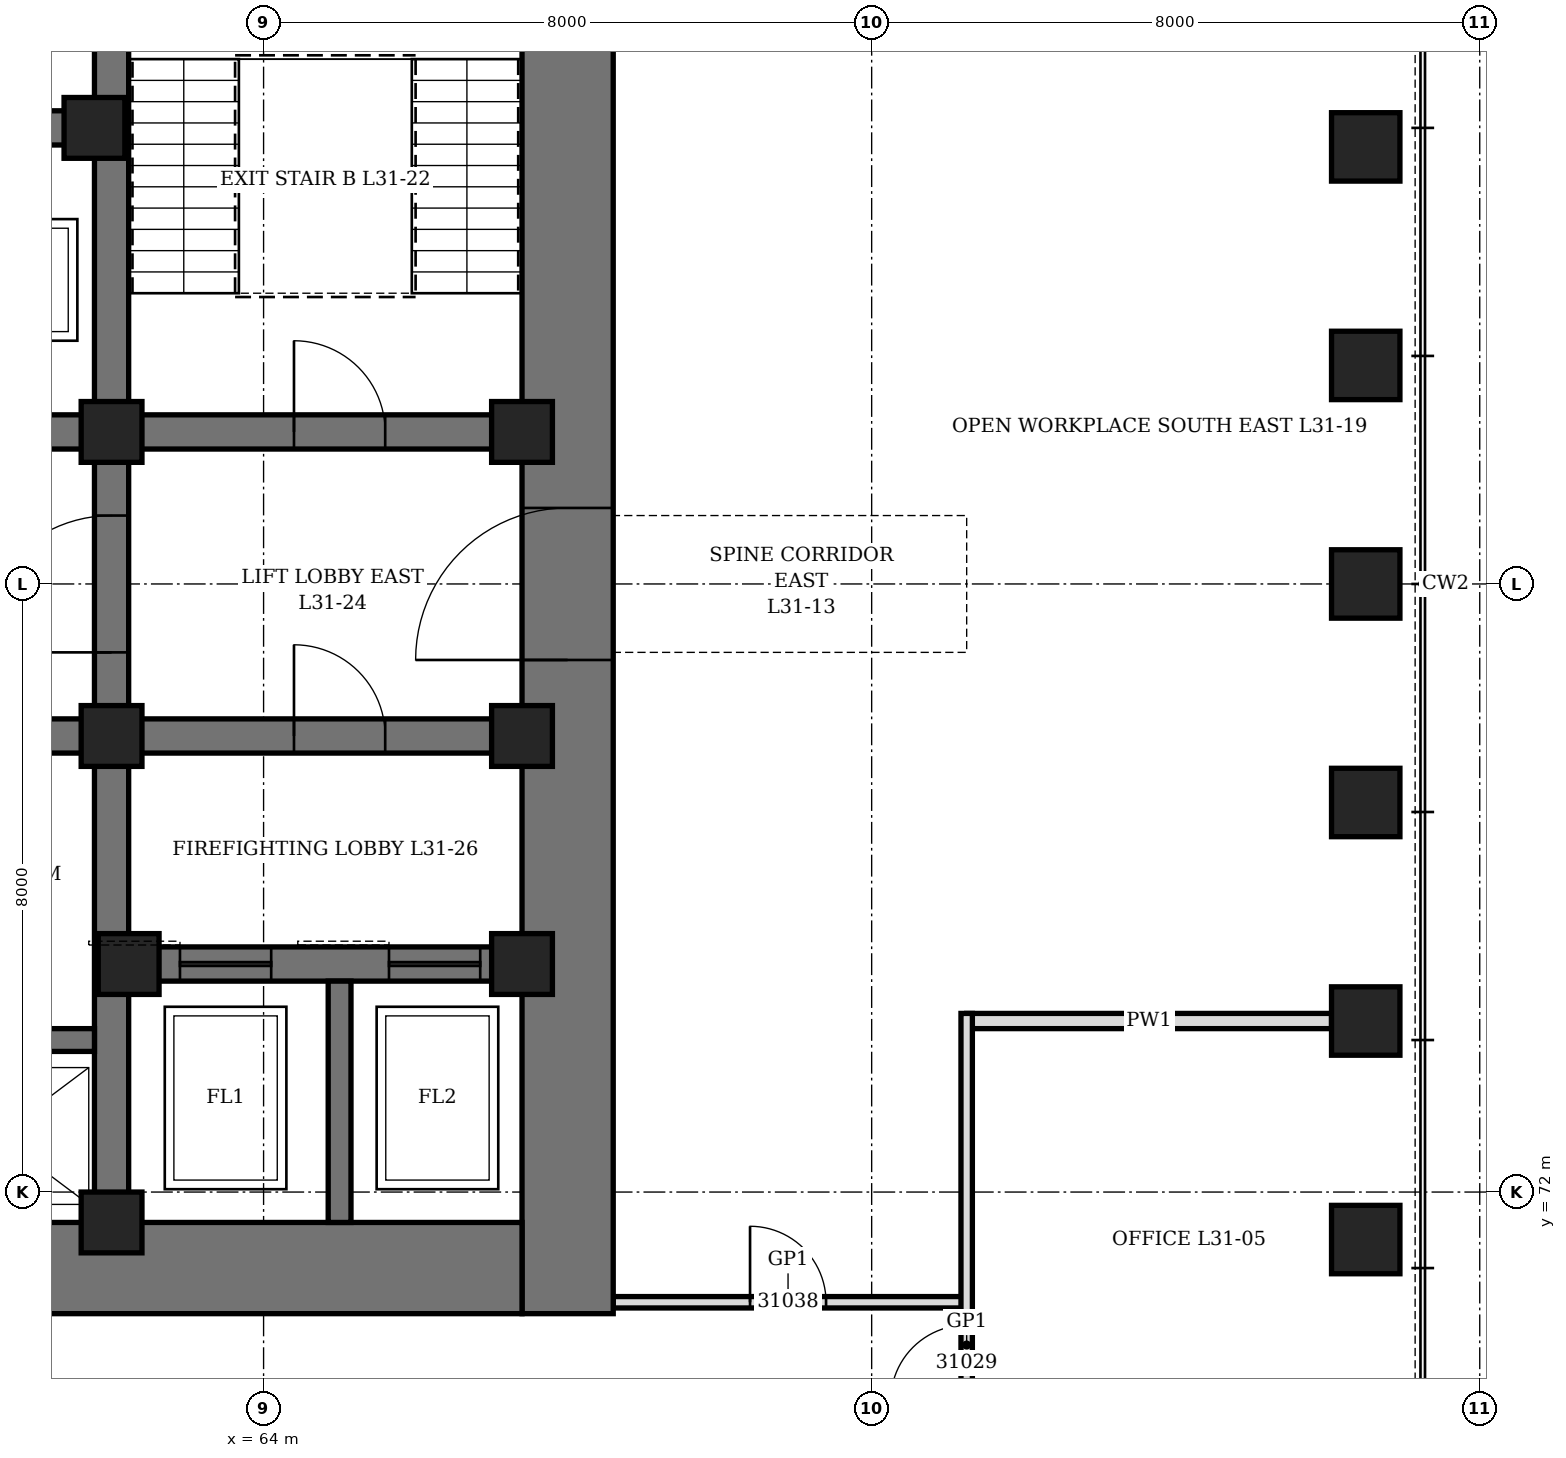
"""IFC4 building model, lengths in metres.
Left out: names, types, materials, properties, quantities, classifications, styles, units other than length and angle.
Written with IfcOpenShell. Run it as: python <this file> out.ifc"""

import sys

from ifc_helpers import new_model, si_unit, direction, frame, frame_2d, origin, origin_2d, place, context, subcontext, project, spatial, rectangle, hollow_rectangle, extrude, element, fill, save


model = new_model("IFC4")
c1 = context("Model", 3, precision=1e-05, world=origin(), true_north=direction((0.0, 1.0)))
c2 = subcontext(c1, "Body", "Model", "MODEL_VIEW")
j1 = project(units=[si_unit("LENGTHUNIT", "METRE"), si_unit("PLANEANGLEUNIT", "RADIAN")], contexts=[c1])
p1 = place(None, origin())
s1 = spatial("IfcSite", under=j1, at=p1, CompositionType="ELEMENT")
p2 = place(p1, origin())
s2 = spatial("IfcBuilding", under=s1, at=p2, CompositionType="ELEMENT")
p3 = place(p2, frame((0.0, 0.0, 141.7)))
s3 = spatial("IfcBuildingStorey", under=s2, at=p3, CompositionType="ELEMENT", Elevation=141.7)
for number, where, z_axis, x_axis in (
    (1, (78.5, 71.375, 0.0), (0.0, 0.0, 1.0), (0.0, 1.0, 0.0)),
    (2, (78.5, 74.25, 0.0), (0.0, 0.0, 1.0), (0.0, 1.0, 0.0)),
    (3, (78.5, 77.125, 0.0), (0.0, 0.0, 1.0), (0.0, 1.0, 0.0)),
    (4, (78.5, 80.0, 0.0), (0.0, 0.0, 1.0), (0.0, 1.0, 0.0)),
    (5, (78.5, 82.875, 0.0), (0.0, 0.0, 1.0), (0.0, 1.0, 0.0)),
    (6, (78.5, 85.75, 0.0), (0.0, 0.0, 1.0), (0.0, 1.0, 0.0)),
):
    element("IfcColumn", number, at=place(p3, frame(where, z_axis=z_axis, x_axis=x_axis)), inside=s3, PredefinedType="COLUMN", context=c2, shape_type="SweptSolid", body=[
        extrude(hollow_rectangle(XDim=0.9, YDim=0.9, WallThickness=0.12, at=origin_2d()), origin(), (0.0, 0.0, 1.0), 4.2),
    ])
p4 = place(p3, frame((68.0, 70.4, 0.0), z_axis=(0.0, 0.0, 1.0), x_axis=(0.0, 1.0, 0.0)))
e7 = element("IfcWall", 7, at=p4, inside=s3, PredefinedType="SHEAR", context=c2, shape_type="SweptSolid", body=[
    extrude(rectangle(XDim=19.2, YDim=1.2, at=frame_2d((9.6, 0.0))), origin(), (0.0, 0.0, 1.0), 4.2),
])
p5 = place(p4, frame((8.6, 0.0, 0.0)))
e8 = element("IfcOpeningElement", 8, at=p5, cuts=e7, PredefinedType="OPENING", context=c2, shape_type="SweptSolid", body=[
    extrude(rectangle(XDim=2.0, YDim=2.4, at=frame_2d((1.0, 1.2))), frame((0.0, 0.61, 0.0), z_axis=(0.0, -1.0, 0.0), x_axis=(1.0, 0.0, 0.0)), (0.0, 0.0, 1.0), 1.22),
])
p6 = place(p3, frame((44.6, 71.0, 0.0), z_axis=(0.0, 0.0, 1.0), x_axis=(1.0, 0.0, 0.0)))
e9 = element("IfcWall", 9, at=p6, inside=s3, PredefinedType="SHEAR", context=c2, shape_type="SweptSolid", body=[
    extrude(rectangle(XDim=22.8, YDim=1.2, at=frame_2d((11.4, 0.0))), origin(), (0.0, 0.0, 1.0), 4.2),
])
p7 = place(p3, frame((62.0, 71.6, 0.0), z_axis=(0.0, 0.0, 1.0), x_axis=(0.0, 1.0, 0.0)))
e10 = element("IfcWall", 10, at=p7, inside=s3, PredefinedType="SHEAR", context=c2, shape_type="SweptSolid", body=[
    extrude(rectangle(XDim=16.8, YDim=0.45, at=frame_2d((8.4, 0.0))), origin(), (0.0, 0.0, 1.0), 4.2),
])
p8 = place(p7, frame((7.5, 0.0, 0.0)))
e11 = element("IfcOpeningElement", 11, at=p8, cuts=e10, PredefinedType="OPENING", context=c2, shape_type="SweptSolid", body=[
    extrude(rectangle(XDim=1.8, YDim=2.4, at=frame_2d((0.9, 1.2))), frame((0.0, 0.235, 0.0), z_axis=(0.0, -1.0, 0.0), x_axis=(1.0, 0.0, 0.0)), (0.0, 0.0, 1.0), 0.47),
])
p9 = place(p3, frame((62.225, 75.0, 0.0), z_axis=(0.0, 0.0, 1.0), x_axis=(1.0, 0.0, 0.0)))
e12 = element("IfcWall", 12, at=p9, inside=s3, PredefinedType="SHEAR", context=c2, shape_type="SweptSolid", body=[
    extrude(rectangle(XDim=5.175, YDim=0.45, at=frame_2d((2.587, 0.0))), origin(), (0.0, 0.0, 1.0), 4.2),
])
p10 = place(p9, frame((0.675, 0.0, 0.0)))
e13 = element("IfcOpeningElement", 13, at=p10, cuts=e12, PredefinedType="OPENING", context=c2, shape_type="SweptSolid", body=[
    extrude(rectangle(XDim=1.2, YDim=2.2, at=frame_2d((0.6, 1.1))), frame((0.0, 0.235, 0.0), z_axis=(0.0, -1.0, 0.0), x_axis=(1.0, 0.0, 0.0)), (0.0, 0.0, 1.0), 0.47),
])
p11 = place(p9, frame((3.425, 0.0, 0.0)))
e14 = element("IfcOpeningElement", 14, at=p11, cuts=e12, PredefinedType="OPENING", context=c2, shape_type="SweptSolid", body=[
    extrude(rectangle(XDim=1.2, YDim=2.2, at=frame_2d((0.6, 1.1))), frame((0.0, 0.235, 0.0), z_axis=(0.0, -1.0, 0.0), x_axis=(1.0, 0.0, 0.0)), (0.0, 0.0, 1.0), 0.47),
])
p12 = place(p3, frame((62.225, 78.0, 0.0), z_axis=(0.0, 0.0, 1.0), x_axis=(1.0, 0.0, 0.0)))
e15 = element("IfcWall", 15, at=p12, inside=s3, PredefinedType="SHEAR", context=c2, shape_type="SweptSolid", body=[
    extrude(rectangle(XDim=5.175, YDim=0.45, at=frame_2d((2.587, 0.0))), origin(), (0.0, 0.0, 1.0), 4.2),
])
p13 = place(p12, frame((2.175, 0.0, 0.0)))
e16 = element("IfcOpeningElement", 16, at=p13, cuts=e15, PredefinedType="OPENING", context=c2, shape_type="SweptSolid", body=[
    extrude(rectangle(XDim=1.2, YDim=2.1, at=frame_2d((0.6, 1.05))), frame((0.0, 0.235, 0.0), z_axis=(0.0, -1.0, 0.0), x_axis=(1.0, 0.0, 0.0)), (0.0, 0.0, 1.0), 0.47),
])
p14 = place(p3, frame((62.225, 82.0, 0.0), z_axis=(0.0, 0.0, 1.0), x_axis=(1.0, 0.0, 0.0)))
e17 = element("IfcWall", 17, at=p14, inside=s3, PredefinedType="SHEAR", context=c2, shape_type="SweptSolid", body=[
    extrude(rectangle(XDim=5.175, YDim=0.45, at=frame_2d((2.587, 0.0))), origin(), (0.0, 0.0, 1.0), 4.2),
])
p15 = place(p14, frame((2.175, 0.0, 0.0)))
e18 = element("IfcOpeningElement", 18, at=p15, cuts=e17, PredefinedType="OPENING", context=c2, shape_type="SweptSolid", body=[
    extrude(rectangle(XDim=1.2, YDim=2.1, at=frame_2d((0.6, 1.05))), frame((0.0, 0.235, 0.0), z_axis=(0.0, -1.0, 0.0), x_axis=(1.0, 0.0, 0.0)), (0.0, 0.0, 1.0), 0.47),
])
p16 = place(p3, frame((50.225, 78.0, 0.0), z_axis=(0.0, 0.0, 1.0), x_axis=(1.0, 0.0, 0.0)))
e19 = element("IfcWall", 19, at=p16, inside=s3, PredefinedType="SHEAR", context=c2, shape_type="SweptSolid", body=[
    extrude(rectangle(XDim=11.55, YDim=0.45, at=frame_2d((5.775, 0.0))), origin(), (0.0, 0.0, 1.0), 4.2),
])
p17 = place(p16, frame((0.825, 0.0, 0.0)))
e20 = element("IfcOpeningElement", 20, at=p17, cuts=e19, PredefinedType="OPENING", context=c2, shape_type="SweptSolid", body=[
    extrude(rectangle(XDim=0.9, YDim=2.1, at=frame_2d((0.45, 1.05))), frame((0.0, 0.235, 0.0), z_axis=(0.0, -1.0, 0.0), x_axis=(1.0, 0.0, 0.0)), (0.0, 0.0, 1.0), 0.47),
])
p18 = place(p16, frame((3.825, 0.0, 0.0)))
e21 = element("IfcOpeningElement", 21, at=p18, cuts=e19, PredefinedType="OPENING", context=c2, shape_type="SweptSolid", body=[
    extrude(rectangle(XDim=0.9, YDim=2.1, at=frame_2d((0.45, 1.05))), frame((0.0, 0.235, 0.0), z_axis=(0.0, -1.0, 0.0), x_axis=(1.0, 0.0, 0.0)), (0.0, 0.0, 1.0), 0.47),
])
p19 = place(p16, frame((6.825, 0.0, 0.0)))
e22 = element("IfcOpeningElement", 22, at=p19, cuts=e19, PredefinedType="OPENING", context=c2, shape_type="SweptSolid", body=[
    extrude(rectangle(XDim=0.9, YDim=2.1, at=frame_2d((0.45, 1.05))), frame((0.0, 0.235, 0.0), z_axis=(0.0, -1.0, 0.0), x_axis=(1.0, 0.0, 0.0)), (0.0, 0.0, 1.0), 0.47),
])
p20 = place(p16, frame((9.825, 0.0, 0.0)))
e23 = element("IfcOpeningElement", 23, at=p20, cuts=e19, PredefinedType="OPENING", context=c2, shape_type="SweptSolid", body=[
    extrude(rectangle(XDim=0.9, YDim=2.1, at=frame_2d((0.45, 1.05))), frame((0.0, 0.235, 0.0), z_axis=(0.0, -1.0, 0.0), x_axis=(1.0, 0.0, 0.0)), (0.0, 0.0, 1.0), 0.47),
])
p21 = place(p3, frame((50.225, 82.0, 0.0), z_axis=(0.0, 0.0, 1.0), x_axis=(1.0, 0.0, 0.0)))
e24 = element("IfcWall", 24, at=p21, inside=s3, PredefinedType="SHEAR", context=c2, shape_type="SweptSolid", body=[
    extrude(rectangle(XDim=11.55, YDim=0.45, at=frame_2d((5.775, 0.0))), origin(), (0.0, 0.0, 1.0), 4.2),
])
p22 = place(p21, frame((0.725, 0.0, 0.0)))
e25 = element("IfcOpeningElement", 25, at=p22, cuts=e24, PredefinedType="OPENING", context=c2, shape_type="SweptSolid", body=[
    extrude(rectangle(XDim=1.1, YDim=2.2, at=frame_2d((0.55, 1.1))), frame((0.0, 0.235, 0.0), z_axis=(0.0, -1.0, 0.0), x_axis=(1.0, 0.0, 0.0)), (0.0, 0.0, 1.0), 0.47),
])
p23 = place(p21, frame((3.725, 0.0, 0.0)))
e26 = element("IfcOpeningElement", 26, at=p23, cuts=e24, PredefinedType="OPENING", context=c2, shape_type="SweptSolid", body=[
    extrude(rectangle(XDim=1.1, YDim=2.2, at=frame_2d((0.55, 1.1))), frame((0.0, 0.235, 0.0), z_axis=(0.0, -1.0, 0.0), x_axis=(1.0, 0.0, 0.0)), (0.0, 0.0, 1.0), 0.47),
])
p24 = place(p21, frame((6.725, 0.0, 0.0)))
e27 = element("IfcOpeningElement", 27, at=p24, cuts=e24, PredefinedType="OPENING", context=c2, shape_type="SweptSolid", body=[
    extrude(rectangle(XDim=1.1, YDim=2.2, at=frame_2d((0.55, 1.1))), frame((0.0, 0.235, 0.0), z_axis=(0.0, -1.0, 0.0), x_axis=(1.0, 0.0, 0.0)), (0.0, 0.0, 1.0), 0.47),
])
p25 = place(p21, frame((9.725, 0.0, 0.0)))
e28 = element("IfcOpeningElement", 28, at=p25, cuts=e24, PredefinedType="OPENING", context=c2, shape_type="SweptSolid", body=[
    extrude(rectangle(XDim=1.1, YDim=2.2, at=frame_2d((0.55, 1.1))), frame((0.0, 0.235, 0.0), z_axis=(0.0, -1.0, 0.0), x_axis=(1.0, 0.0, 0.0)), (0.0, 0.0, 1.0), 0.47),
])
p26 = place(p3, frame((50.225, 86.0, 0.0), z_axis=(0.0, 0.0, 1.0), x_axis=(1.0, 0.0, 0.0)))
e29 = element("IfcWall", 29, at=p26, inside=s3, PredefinedType="SHEAR", context=c2, shape_type="SweptSolid", body=[
    extrude(rectangle(XDim=11.55, YDim=0.45, at=frame_2d((5.775, 0.0))), origin(), (0.0, 0.0, 1.0), 4.2),
])
p27 = place(p3, frame((50.225, 74.0, 0.0), z_axis=(0.0, 0.0, 1.0), x_axis=(1.0, 0.0, 0.0)))
e30 = element("IfcWall", 30, at=p27, inside=s3, PredefinedType="SHEAR", context=c2, shape_type="SweptSolid", body=[
    extrude(rectangle(XDim=11.55, YDim=0.3, at=frame_2d((5.775, 0.0))), origin(), (0.0, 0.0, 1.0), 4.2),
])
p28 = place(p3, frame((65.0, 71.6, 0.0), z_axis=(0.0, 0.0, 1.0), x_axis=(0.0, 1.0, 0.0)))
e31 = element("IfcWall", 31, at=p28, inside=s3, PredefinedType="SHEAR", context=c2, shape_type="SweptSolid", body=[
    extrude(rectangle(XDim=3.175, YDim=0.3, at=frame_2d((1.587, 0.0))), origin(), (0.0, 0.0, 1.0), 4.2),
])
for number, where, z_axis, x_axis in (
    (32, (61.775, 86.0, 0.0), (0.0, 0.0, 1.0), (1.0, 0.0, 0.0)),
    (33, (62.0, 71.6, 0.0), (0.0, 0.0, 1.0), (1.0, 0.0, 0.0)),
    (34, (62.0, 78.0, 0.0), (0.0, 0.0, 1.0), (1.0, 0.0, 0.0)),
    (35, (62.0, 82.0, 0.0), (0.0, 0.0, 1.0), (1.0, 0.0, 0.0)),
    (36, (62.225, 75.0, 0.0), (0.0, 0.0, 1.0), (1.0, 0.0, 0.0)),
    (37, (67.4, 75.0, 0.0), (0.0, 0.0, 1.0), (1.0, 0.0, 0.0)),
    (38, (67.4, 78.0, 0.0), (0.0, 0.0, 1.0), (1.0, 0.0, 0.0)),
    (39, (67.4, 82.0, 0.0), (0.0, 0.0, 1.0), (1.0, 0.0, 0.0)),
):
    element("IfcColumn", number, at=place(p3, frame(where, z_axis=z_axis, x_axis=x_axis)), inside=s3, PredefinedType="COLUMN", context=c2, shape_type="SweptSolid", body=[
        extrude(hollow_rectangle(XDim=0.8, YDim=0.8, WallThickness=0.1, at=origin_2d()), origin(), (0.0, 0.0, 1.0), 4.2),
    ])
p29 = place(p3, frame((73.25, 74.25, 0.0), z_axis=(0.0, 0.0, 1.0), x_axis=(1.0, 0.0, 0.0)))
e40 = element("IfcWall", 40, at=p29, inside=s3, PredefinedType="PARTITIONING", context=c2, shape_type="SweptSolid", body=[
    extrude(rectangle(XDim=4.8, YDim=0.2, at=frame_2d((2.4, 0.0))), origin(), (0.0, 0.0, 1.0), 3.428),
])
p30 = place(p3, frame((68.6, 70.55, 0.0), z_axis=(0.0, 0.0, 1.0), x_axis=(1.0, 0.0, 0.0)))
e41 = element("IfcWall", 41, at=p30, inside=s3, PredefinedType="PARTITIONING", context=c2, shape_type="SweptSolid", body=[
    extrude(rectangle(XDim=4.6, YDim=0.15, at=frame_2d((2.3, 0.0))), origin(), (0.0, 0.0, 1.0), 4.04),
])
p31 = place(p30, frame((1.8, 0.0, 0.0)))
e42 = element("IfcOpeningElement", 42, at=p31, cuts=e41, PredefinedType="OPENING", context=c2, shape_type="SweptSolid", body=[
    extrude(rectangle(XDim=1.0, YDim=2.4, at=frame_2d((0.5, 1.2))), frame((0.0, 0.085, 0.0), z_axis=(0.0, -1.0, 0.0), x_axis=(1.0, 0.0, 0.0)), (0.0, 0.0, 1.0), 0.17),
])
p32 = place(p3, frame((73.25, 65.625, 0.0), z_axis=(0.0, 0.0, 1.0), x_axis=(0.0, 1.0, 0.0)))
e43 = element("IfcWall", 43, at=p32, inside=s3, PredefinedType="PARTITIONING", context=c2, shape_type="SweptSolid", body=[
    extrude(rectangle(XDim=8.725, YDim=0.15, at=frame_2d((4.363, 0.0))), origin(), (0.0, 0.0, 1.0), 4.04),
])
p33 = place(p32, frame((0.938, 0.0, 0.0)))
e44 = element("IfcOpeningElement", 44, at=p33, cuts=e43, PredefinedType="OPENING", context=c2, shape_type="SweptSolid", body=[
    extrude(rectangle(XDim=1.0, YDim=2.4, at=frame_2d((0.5, 1.2))), frame((0.0, 0.085, 0.0), z_axis=(0.0, -1.0, 0.0), x_axis=(1.0, 0.0, 0.0)), (0.0, 0.0, 1.0), 0.17),
])
p34 = place(p32, frame((3.625, 0.0, 0.0)))
e45 = element("IfcOpeningElement", 45, at=p34, cuts=e43, PredefinedType="OPENING", context=c2, shape_type="SweptSolid", body=[
    extrude(rectangle(XDim=1.0, YDim=2.1, at=frame_2d((0.5, 1.05))), frame((0.0, 0.085, 0.0), z_axis=(0.0, -1.0, 0.0), x_axis=(1.0, 0.0, 0.0)), (0.0, 0.0, 1.0), 0.17),
])
p35 = place(p15, origin())
e46 = element("IfcDoor", 46, at=p35, inside=s3, OperationType="SINGLE_SWING_LEFT", PredefinedType="DOOR", context=c2, shape_type="SweptSolid", body=[
    extrude(rectangle(XDim=1.2, YDim=2.1, at=frame_2d((0.6, 1.05))), frame((0.0, 0.225, 0.0), z_axis=(0.0, -1.0, 0.0), x_axis=(1.0, 0.0, 0.0)), (0.0, 0.0, 1.0), 0.449),
])
fill(e18, e46)
p36 = place(p5, origin())
e47 = element("IfcDoor", 47, at=p36, inside=s3, OperationType="DOUBLE_DOOR_SINGLE_SWING", PredefinedType="DOOR", context=c2, shape_type="SweptSolid", body=[
    extrude(rectangle(XDim=2.0, YDim=2.4, at=frame_2d((1.0, 1.2))), frame((0.0, 0.35, 0.0), z_axis=(0.0, -1.0, 0.0), x_axis=(1.0, 0.0, 0.0)), (0.0, 0.0, 1.0), 0.7),
])
fill(e8, e47)
p37 = place(p8, origin())
e48 = element("IfcDoor", 48, at=p37, inside=s3, OperationType="DOUBLE_DOOR_SINGLE_SWING", PredefinedType="DOOR", context=c2, shape_type="SweptSolid", body=[
    extrude(rectangle(XDim=1.8, YDim=2.4, at=frame_2d((0.9, 1.2))), frame((0.0, 0.225, 0.0), z_axis=(0.0, -1.0, 0.0), x_axis=(1.0, 0.0, 0.0)), (0.0, 0.0, 1.0), 0.449),
])
fill(e11, e48)
p38 = place(p13, origin())
e49 = element("IfcDoor", 49, at=p38, inside=s3, OperationType="SINGLE_SWING_RIGHT", PredefinedType="DOOR", context=c2, shape_type="SweptSolid", body=[
    extrude(rectangle(XDim=1.2, YDim=2.1, at=frame_2d((0.6, 1.05))), frame((0.0, 0.225, 0.0), z_axis=(0.0, -1.0, 0.0), x_axis=(1.0, 0.0, 0.0)), (0.0, 0.0, 1.0), 0.449),
])
fill(e16, e49)
p39 = place(p10, origin())
e50 = element("IfcDoor", 50, at=p39, inside=s3, OperationType="SLIDING_TO_LEFT", PredefinedType="DOOR", context=c2, shape_type="SweptSolid", body=[
    extrude(rectangle(XDim=1.2, YDim=2.2, at=frame_2d((0.6, 1.1))), frame((0.0, 0.225, 0.0), z_axis=(0.0, -1.0, 0.0), x_axis=(1.0, 0.0, 0.0)), (0.0, 0.0, 1.0), 0.449),
])
fill(e13, e50)
p40 = place(p11, origin())
e51 = element("IfcDoor", 51, at=p40, inside=s3, OperationType="SLIDING_TO_LEFT", PredefinedType="DOOR", context=c2, shape_type="SweptSolid", body=[
    extrude(rectangle(XDim=1.2, YDim=2.2, at=frame_2d((0.6, 1.1))), frame((0.0, 0.225, 0.0), z_axis=(0.0, -1.0, 0.0), x_axis=(1.0, 0.0, 0.0)), (0.0, 0.0, 1.0), 0.449),
])
fill(e14, e51)
p41 = place(p34, origin())
e52 = element("IfcDoor", 52, at=p41, inside=s3, OperationType="SINGLE_SWING_LEFT", PredefinedType="DOOR", context=c2, shape_type="SweptSolid", body=[
    extrude(rectangle(XDim=1.0, YDim=2.1, at=frame_2d((0.5, 1.05))), frame((0.0, 0.075, 0.0), z_axis=(0.0, -1.0, 0.0), x_axis=(1.0, 0.0, 0.0)), (0.0, 0.0, 1.0), 0.149),
])
fill(e45, e52)
p42 = place(p31, origin())
e53 = element("IfcDoor", 53, at=p42, inside=s3, OperationType="SINGLE_SWING_RIGHT", PredefinedType="DOOR", context=c2, shape_type="SweptSolid", body=[
    extrude(rectangle(XDim=1.0, YDim=2.4, at=frame_2d((0.5, 1.2))), frame((0.0, 0.075, 0.0), z_axis=(0.0, -1.0, 0.0), x_axis=(1.0, 0.0, 0.0)), (0.0, 0.0, 1.0), 0.149),
])
fill(e42, e53)
save(model, sys.argv[1])
